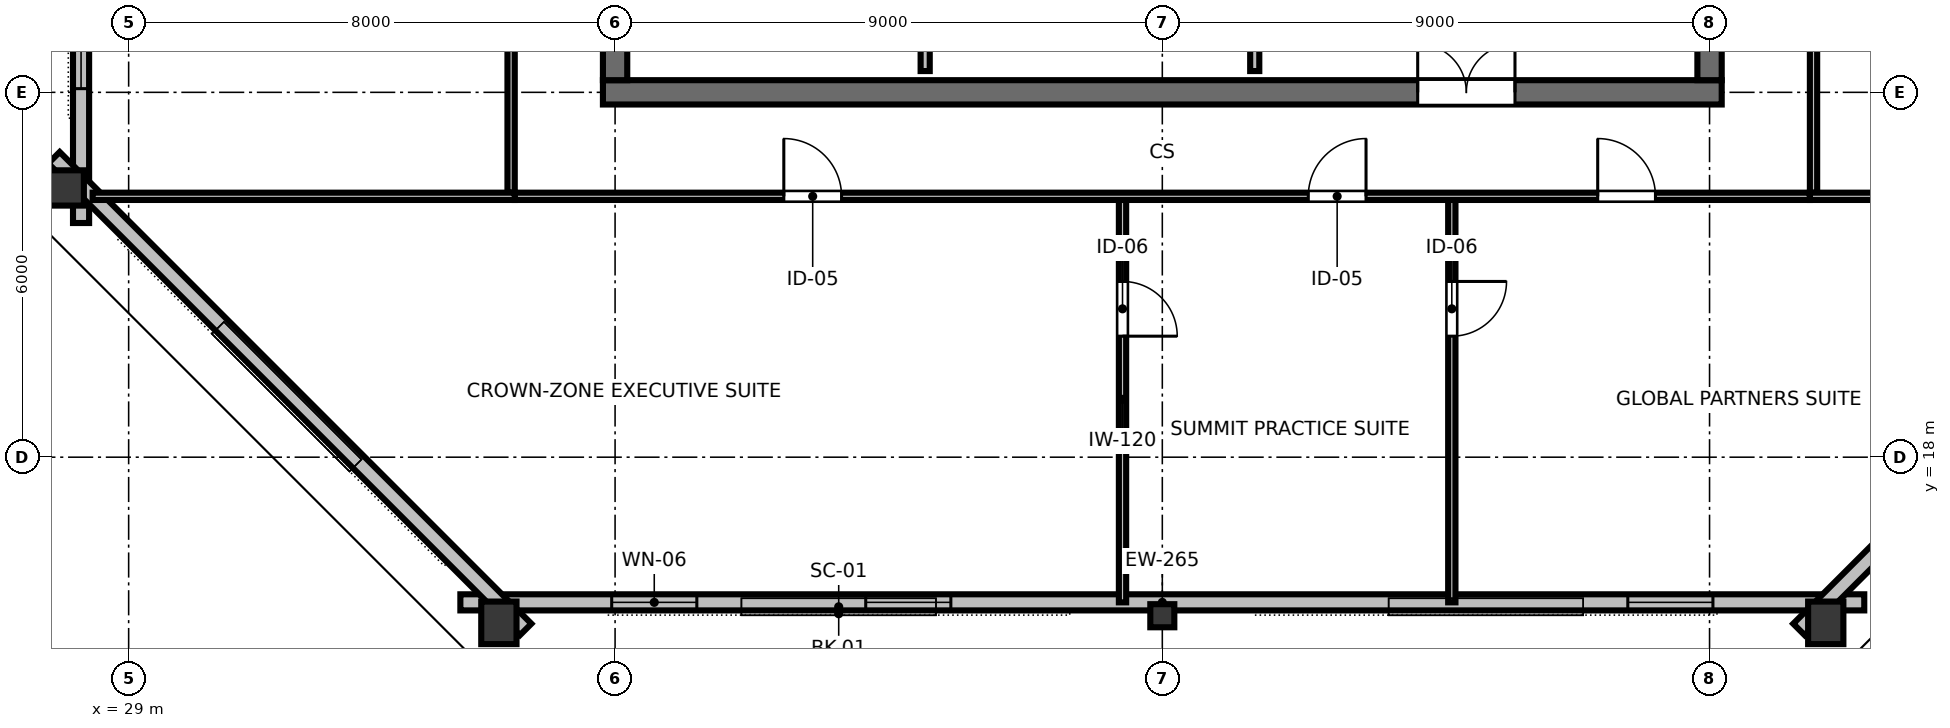
"""IFC4 building model, lengths in metres.
Left out: names, types, materials, properties, quantities, classifications, styles, units other than length and angle.
Written with IfcOpenShell. Run it as: python <this file> out.ifc"""

import sys

from ifc_helpers import new_model, si_unit, direction, frame, frame_2d, origin, origin_2d, place, context, subcontext, project, spatial, rectangle, hollow_rectangle, i_section, extrude, element, fill, save


model = new_model("IFC4")
c1 = context("Model", 3, precision=1e-05, world=origin(), true_north=direction((0.0, 1.0)))
c2 = subcontext(c1, "Body", "Model", "MODEL_VIEW")
j1 = project(units=[si_unit("LENGTHUNIT", "METRE"), si_unit("PLANEANGLEUNIT", "RADIAN")], contexts=[c1])
p1 = place(None, origin())
s1 = spatial("IfcSite", under=j1, at=p1, CompositionType="ELEMENT")
p2 = place(p1, origin())
s2 = spatial("IfcBuilding", under=s1, at=p2, CompositionType="ELEMENT")
p3 = place(p2, frame((0.0, 0.0, 264.6)))
s3 = spatial("IfcBuildingStorey", under=s2, at=p3, CompositionType="ELEMENT", Elevation=264.6)
p4 = place(p3, frame((36.8, 24.0, 0.0), z_axis=(0.0, 0.0, 1.0), x_axis=(1.0, 0.0, 0.0)))
e1 = element("IfcWall", 1, at=p4, inside=s3, PredefinedType="SHEAR", context=c2, shape_type="SweptSolid", body=[
    extrude(rectangle(XDim=18.4, YDim=0.4, at=frame_2d((9.2, 0.0))), origin(), (0.0, 0.0, 1.0), 3.36),
])
p5 = place(p4, frame((13.4, 0.0, 0.0)))
e2 = element("IfcOpeningElement", 2, at=p5, cuts=e1, PredefinedType="OPENING", context=c2, shape_type="SweptSolid", body=[
    extrude(rectangle(XDim=1.6, YDim=2.15, at=frame_2d((0.8, 1.075))), frame((0.0, 0.21, 0.0), z_axis=(0.0, -1.0, 0.0), x_axis=(1.0, 0.0, 0.0)), (0.0, 0.0, 1.0), 0.42),
])
p6 = place(p3, frame((37.0, 24.2, 0.0), z_axis=(0.0, 0.0, 1.0), x_axis=(0.0, 1.0, 0.0)))
e3 = element("IfcWall", 3, at=p6, inside=s3, PredefinedType="SHEAR", context=c2, shape_type="SweptSolid", body=[
    extrude(rectangle(XDim=15.6, YDim=0.4, at=frame_2d((7.8, 0.0))), origin(), (0.0, 0.0, 1.0), 3.36),
])
p7 = place(p6, frame((5.325, 0.0, 0.0)))
e4 = element("IfcOpeningElement", 4, at=p7, cuts=e3, PredefinedType="OPENING", context=c2, shape_type="SweptSolid", body=[
    extrude(rectangle(XDim=1.15, YDim=2.15, at=frame_2d((0.575, 1.075))), frame((0.0, 0.21, 0.0), z_axis=(0.0, -1.0, 0.0), x_axis=(1.0, 0.0, 0.0)), (0.0, 0.0, 1.0), 0.42),
])
p8 = place(p3, frame((55.0, 24.2, 0.0), z_axis=(0.0, 0.0, 1.0), x_axis=(0.0, 1.0, 0.0)))
e5 = element("IfcWall", 5, at=p8, inside=s3, PredefinedType="SHEAR", context=c2, shape_type="SweptSolid", body=[
    extrude(rectangle(XDim=15.6, YDim=0.4, at=frame_2d((7.8, 0.0))), origin(), (0.0, 0.0, 1.0), 3.36),
])
p9 = place(p8, frame((5.325, 0.0, 0.0)))
e6 = element("IfcOpeningElement", 6, at=p9, cuts=e5, PredefinedType="OPENING", context=c2, shape_type="SweptSolid", body=[
    extrude(rectangle(XDim=1.15, YDim=2.15, at=frame_2d((0.575, 1.075))), frame((0.0, 0.21, 0.0), z_axis=(0.0, -1.0, 0.0), x_axis=(1.0, 0.0, 0.0)), (0.0, 0.0, 1.0), 0.42),
])
p10 = place(p3, frame((35.089, 15.276, 0.0), z_axis=(0.0, 0.0, 1.0), x_axis=(1.0, 0.0, 0.0)))
e7 = element("IfcColumn", 7, at=p10, inside=s3, PredefinedType="COLUMN", context=c2, shape_type="SweptSolid", body=[
    extrude(hollow_rectangle(XDim=0.58, YDim=0.7, WallThickness=0.032, at=origin_2d()), origin(), (0.0, 0.0, 1.0), 3.373),
])
p11 = place(p3, frame((46.0, 15.393, 0.0), z_axis=(0.0, 0.0, 1.0), x_axis=(1.0, 0.0, 0.0)))
e8 = element("IfcColumn", 8, at=p11, inside=s3, PredefinedType="COLUMN", context=c2, shape_type="SweptSolid", body=[
    extrude(i_section(OverallWidth=0.395, OverallDepth=0.38, WebThickness=0.019, FlangeThickness=0.03, FilletRadius=0.025, at=origin_2d()), origin(), (0.0, 0.0, 1.0), 3.373),
])
for number, where, z_axis, x_axis in (
    (9, (56.911, 15.276, 0.0), (0.0, 0.0, 1.0), (1.0, 0.0, 0.0)),
    (10, (27.914, 22.428, 0.0), (0.0, 0.0, 1.0), (0.0, 1.0, 0.0)),
):
    element("IfcColumn", number, at=place(p3, frame(where, z_axis=z_axis, x_axis=x_axis)), inside=s3, PredefinedType="COLUMN", context=c2, shape_type="SweptSolid", body=[
        extrude(hollow_rectangle(XDim=0.58, YDim=0.7, WallThickness=0.032, at=origin_2d()), origin(), (0.0, 0.0, 1.0), 3.373),
    ])
p12 = place(p3, frame((34.456, 15.613, 0.0), z_axis=(0.0, 0.0, 1.0), x_axis=(1.0, 0.0, 0.0)))
e11 = element("IfcWall", 11, at=p12, inside=s3, PredefinedType="STANDARD", context=c2, shape_type="SweptSolid", body=[
    extrude(rectangle(XDim=23.089, YDim=0.265, at=frame_2d((11.544, 0.0))), origin(), (0.0, 0.0, 1.0), 2.832),
])
p13 = place(p12, frame((2.489, 0.0, 0.85)))
e12 = element("IfcOpeningElement", 12, at=p13, cuts=e11, PredefinedType="OPENING", context=c2, shape_type="SweptSolid", body=[
    extrude(rectangle(XDim=1.4, YDim=1.2, at=frame_2d((0.7, 0.6))), frame((0.0, 0.142, 0.0), z_axis=(0.0, -1.0, 0.0), x_axis=(1.0, 0.0, 0.0)), (0.0, 0.0, 1.0), 0.285),
])
p14 = place(p12, frame((6.667, 0.0, 0.85)))
e13 = element("IfcOpeningElement", 13, at=p14, cuts=e11, PredefinedType="OPENING", context=c2, shape_type="SweptSolid", body=[
    extrude(rectangle(XDim=1.4, YDim=1.2, at=frame_2d((0.7, 0.6))), frame((0.0, 0.142, 0.0), z_axis=(0.0, -1.0, 0.0), x_axis=(1.0, 0.0, 0.0)), (0.0, 0.0, 1.0), 0.285),
])
p15 = place(p12, frame((19.2, 0.0, 0.85)))
e14 = element("IfcOpeningElement", 14, at=p15, cuts=e11, PredefinedType="OPENING", context=c2, shape_type="SweptSolid", body=[
    extrude(rectangle(XDim=1.4, YDim=1.2, at=frame_2d((0.7, 0.6))), frame((0.0, 0.142, 0.0), z_axis=(0.0, -1.0, 0.0), x_axis=(1.0, 0.0, 0.0)), (0.0, 0.0, 1.0), 0.285),
])
p16 = place(p3, frame((56.47, 15.168, 0.0), z_axis=(0.0, 0.0, 1.0), x_axis=(0.707106781187, 0.707106781187, 0.0)))
e15 = element("IfcWall", 15, at=p16, inside=s3, PredefinedType="STANDARD", context=c2, shape_type="SweptSolid", body=[
    extrude(rectangle(XDim=10.971, YDim=0.265, at=frame_2d((5.485, 0.0))), origin(), (0.0, 0.0, 1.0), 2.832),
])
p17 = place(p3, frame((28.217, 42.149, 0.0), z_axis=(0.0, 0.0, 1.0), x_axis=(0.0, -1.0, 0.0)))
e16 = element("IfcWall", 16, at=p17, inside=s3, PredefinedType="STANDARD", context=c2, shape_type="SweptSolid", body=[
    extrude(rectangle(XDim=20.298, YDim=0.265, at=frame_2d((10.149, 0.0))), origin(), (0.0, 0.0, 1.0), 2.832),
])
p18 = place(p17, frame((2.21, 0.0, 0.85)))
e17 = element("IfcOpeningElement", 17, at=p18, cuts=e16, PredefinedType="OPENING", context=c2, shape_type="SweptSolid", body=[
    extrude(rectangle(XDim=1.4, YDim=1.2, at=frame_2d((0.7, 0.6))), frame((0.0, 0.142, 0.0), z_axis=(0.0, -1.0, 0.0), x_axis=(1.0, 0.0, 0.0)), (0.0, 0.0, 1.0), 0.285),
])
p19 = place(p17, frame((5.83, 0.0, 0.85)))
e18 = element("IfcOpeningElement", 18, at=p19, cuts=e16, PredefinedType="OPENING", context=c2, shape_type="SweptSolid", body=[
    extrude(rectangle(XDim=1.4, YDim=1.2, at=frame_2d((0.7, 0.6))), frame((0.0, 0.142, 0.0), z_axis=(0.0, -1.0, 0.0), x_axis=(1.0, 0.0, 0.0)), (0.0, 0.0, 1.0), 0.285),
])
p20 = place(p17, frame((16.688, 0.0, 0.85)))
e19 = element("IfcOpeningElement", 19, at=p20, cuts=e16, PredefinedType="OPENING", context=c2, shape_type="SweptSolid", body=[
    extrude(rectangle(XDim=1.4, YDim=1.2, at=frame_2d((0.7, 0.6))), frame((0.0, 0.142, 0.0), z_axis=(0.0, -1.0, 0.0), x_axis=(1.0, 0.0, 0.0)), (0.0, 0.0, 1.0), 0.285),
])
p21 = place(p3, frame((27.772, 22.925, 0.0), z_axis=(0.0, 0.0, 1.0), x_axis=(0.707106781187, -0.707106781187, 0.0)))
e20 = element("IfcWall", 20, at=p21, inside=s3, PredefinedType="STANDARD", context=c2, shape_type="SweptSolid", body=[
    extrude(rectangle(XDim=10.971, YDim=0.265, at=frame_2d((5.485, 0.0))), origin(), (0.0, 0.0, 1.0), 2.832),
])
p22 = place(p3, frame((42.1, 24.35, 0.0), z_axis=(0.0, 0.0, 1.0), x_axis=(0.0, 1.0, 0.0)))
e21 = element("IfcWall", 21, at=p22, inside=s3, PredefinedType="PARTITIONING", context=c2, shape_type="SweptSolid", body=[
    extrude(rectangle(XDim=3.9, YDim=0.15, at=frame_2d((1.95, 0.0))), origin(), (0.0, 0.0, 1.0), 3.375),
])
p23 = place(p22, frame((1.5, 0.0, 0.0)))
e22 = element("IfcOpeningElement", 22, at=p23, cuts=e21, PredefinedType="OPENING", context=c2, shape_type="SweptSolid", body=[
    extrude(rectangle(XDim=0.9, YDim=2.15, at=frame_2d((0.45, 1.075))), frame((0.0, 0.085, 0.0), z_axis=(0.0, -1.0, 0.0), x_axis=(1.0, 0.0, 0.0)), (0.0, 0.0, 1.0), 0.17),
])
p24 = place(p3, frame((47.52, 24.35, 0.0), z_axis=(0.0, 0.0, 1.0), x_axis=(0.0, 1.0, 0.0)))
e23 = element("IfcWall", 23, at=p24, inside=s3, PredefinedType="PARTITIONING", context=c2, shape_type="SweptSolid", body=[
    extrude(rectangle(XDim=3.9, YDim=0.15, at=frame_2d((1.95, 0.0))), origin(), (0.0, 0.0, 1.0), 3.375),
])
p25 = place(p24, frame((0.35, 0.0, 0.0)))
e24 = element("IfcOpeningElement", 24, at=p25, cuts=e23, PredefinedType="OPENING", context=c2, shape_type="SweptSolid", body=[
    extrude(rectangle(XDim=0.9, YDim=2.15, at=frame_2d((0.45, 1.075))), frame((0.0, 0.085, 0.0), z_axis=(0.0, -1.0, 0.0), x_axis=(1.0, 0.0, 0.0)), (0.0, 0.0, 1.0), 0.17),
])
p26 = place(p3, frame((45.345, 22.29, 0.0), z_axis=(0.0, 0.0, 1.0), x_axis=(0.0, -1.0, 0.0)))
e25 = element("IfcWall", 25, at=p26, inside=s3, PredefinedType="PARTITIONING", context=c2, shape_type="SweptSolid", body=[
    extrude(rectangle(XDim=6.677, YDim=0.12, at=frame_2d((3.339, 0.0))), origin(), (0.0, 0.0, 1.0), 2.655),
])
p27 = place(p26, frame((1.4, 0.0, 0.0)))
e26 = element("IfcOpeningElement", 26, at=p27, cuts=e25, PredefinedType="OPENING", context=c2, shape_type="SweptSolid", body=[
    extrude(rectangle(XDim=0.9, YDim=2.15, at=frame_2d((0.45, 1.075))), frame((0.0, 0.07, 0.0), z_axis=(0.0, -1.0, 0.0), x_axis=(1.0, 0.0, 0.0)), (0.0, 0.0, 1.0), 0.14),
])
p28 = place(p3, frame((50.761, 22.29, 0.0), z_axis=(0.0, 0.0, 1.0), x_axis=(0.0, -1.0, 0.0)))
e27 = element("IfcWall", 27, at=p28, inside=s3, PredefinedType="PARTITIONING", context=c2, shape_type="SweptSolid", body=[
    extrude(rectangle(XDim=6.677, YDim=0.12, at=frame_2d((3.339, 0.0))), origin(), (0.0, 0.0, 1.0), 2.655),
])
p29 = place(p28, frame((1.4, 0.0, 0.0)))
e28 = element("IfcOpeningElement", 28, at=p29, cuts=e27, PredefinedType="OPENING", context=c2, shape_type="SweptSolid", body=[
    extrude(rectangle(XDim=0.9, YDim=2.15, at=frame_2d((0.45, 1.075))), frame((0.0, 0.07, 0.0), z_axis=(0.0, -1.0, 0.0), x_axis=(1.0, 0.0, 0.0)), (0.0, 0.0, 1.0), 0.14),
])
p30 = place(p3, frame((35.35, 22.29, 0.0), z_axis=(0.0, 0.0, 1.0), x_axis=(1.0, 0.0, 0.0)))
e29 = element("IfcWall", 29, at=p30, inside=s3, PredefinedType="PARTITIONING", context=c2, shape_type="SweptSolid", body=[
    extrude(rectangle(XDim=21.3, YDim=0.12, at=frame_2d((10.65, 0.0))), origin(), (0.0, 0.0, 1.0), 2.655),
])
p31 = place(p30, frame((4.425, 0.0, 0.0)))
e30 = element("IfcOpeningElement", 30, at=p31, cuts=e29, PredefinedType="OPENING", context=c2, shape_type="SweptSolid", body=[
    extrude(rectangle(XDim=0.95, YDim=2.15, at=frame_2d((0.475, 1.075))), frame((0.0, 0.07, 0.0), z_axis=(0.0, -1.0, 0.0), x_axis=(1.0, 0.0, 0.0)), (0.0, 0.0, 1.0), 0.14),
])
p32 = place(p30, frame((13.051, 0.0, 0.0)))
e31 = element("IfcOpeningElement", 31, at=p32, cuts=e29, PredefinedType="OPENING", context=c2, shape_type="SweptSolid", body=[
    extrude(rectangle(XDim=0.95, YDim=2.15, at=frame_2d((0.475, 1.075))), frame((0.0, 0.07, 0.0), z_axis=(0.0, -1.0, 0.0), x_axis=(1.0, 0.0, 0.0)), (0.0, 0.0, 1.0), 0.14),
])
p33 = place(p30, frame((17.811, 0.0, 0.0)))
e32 = element("IfcOpeningElement", 32, at=p33, cuts=e29, PredefinedType="OPENING", context=c2, shape_type="SweptSolid", body=[
    extrude(rectangle(XDim=0.95, YDim=2.15, at=frame_2d((0.475, 1.075))), frame((0.0, 0.07, 0.0), z_axis=(0.0, -1.0, 0.0), x_axis=(1.0, 0.0, 0.0)), (0.0, 0.0, 1.0), 0.14),
])
p34 = place(p3, frame((35.29, 22.35, 0.0), z_axis=(0.0, 0.0, 1.0), x_axis=(0.0, 1.0, 0.0)))
e33 = element("IfcWall", 33, at=p34, inside=s3, PredefinedType="PARTITIONING", context=c2, shape_type="SweptSolid", body=[
    extrude(rectangle(XDim=19.3, YDim=0.12, at=frame_2d((9.65, 0.0))), origin(), (0.0, 0.0, 1.0), 2.655),
])
p35 = place(p34, frame((2.847, 0.0, 0.0)))
e34 = element("IfcOpeningElement", 34, at=p35, cuts=e33, PredefinedType="OPENING", context=c2, shape_type="SweptSolid", body=[
    extrude(rectangle(XDim=0.95, YDim=2.15, at=frame_2d((0.475, 1.075))), frame((0.0, 0.07, 0.0), z_axis=(0.0, -1.0, 0.0), x_axis=(1.0, 0.0, 0.0)), (0.0, 0.0, 1.0), 0.14),
])
p36 = place(p34, frame((8.606, 0.0, 0.0)))
e35 = element("IfcOpeningElement", 35, at=p36, cuts=e33, PredefinedType="OPENING", context=c2, shape_type="SweptSolid", body=[
    extrude(rectangle(XDim=0.95, YDim=2.15, at=frame_2d((0.475, 1.075))), frame((0.0, 0.07, 0.0), z_axis=(0.0, -1.0, 0.0), x_axis=(1.0, 0.0, 0.0)), (0.0, 0.0, 1.0), 0.14),
])
p37 = place(p34, frame((14.935, 0.0, 0.0)))
e36 = element("IfcOpeningElement", 36, at=p37, cuts=e33, PredefinedType="OPENING", context=c2, shape_type="SweptSolid", body=[
    extrude(rectangle(XDim=0.95, YDim=2.15, at=frame_2d((0.475, 1.075))), frame((0.0, 0.07, 0.0), z_axis=(0.0, -1.0, 0.0), x_axis=(1.0, 0.0, 0.0)), (0.0, 0.0, 1.0), 0.14),
])
p38 = place(p3, frame((56.71, 22.35, 0.0), z_axis=(0.0, 0.0, 1.0), x_axis=(0.0, 1.0, 0.0)))
e37 = element("IfcWall", 37, at=p38, inside=s3, PredefinedType="PARTITIONING", context=c2, shape_type="SweptSolid", body=[
    extrude(rectangle(XDim=19.3, YDim=0.12, at=frame_2d((9.65, 0.0))), origin(), (0.0, 0.0, 1.0), 2.655),
])
p39 = place(p38, frame((3.646, 0.0, 0.0)))
e38 = element("IfcOpeningElement", 38, at=p39, cuts=e37, PredefinedType="OPENING", context=c2, shape_type="SweptSolid", body=[
    extrude(rectangle(XDim=0.95, YDim=2.15, at=frame_2d((0.475, 1.075))), frame((0.0, 0.07, 0.0), z_axis=(0.0, -1.0, 0.0), x_axis=(1.0, 0.0, 0.0)), (0.0, 0.0, 1.0), 0.14),
])
p40 = place(p38, frame((13.096, 0.0, 0.0)))
e39 = element("IfcOpeningElement", 39, at=p40, cuts=e37, PredefinedType="OPENING", context=c2, shape_type="SweptSolid", body=[
    extrude(rectangle(XDim=0.95, YDim=2.15, at=frame_2d((0.475, 1.075))), frame((0.0, 0.07, 0.0), z_axis=(0.0, -1.0, 0.0), x_axis=(1.0, 0.0, 0.0)), (0.0, 0.0, 1.0), 0.14),
])
for number, where, z_axis, x_axis in (
    (40, (35.35, 22.29, 0.0), (0.0, 0.0, 1.0), (-1.0, 0.0, 0.0)),
    (41, (56.65, 22.29, 0.0), (0.0, 0.0, 1.0), (1.0, 0.0, 0.0)),
):
    element("IfcWall", number, at=place(p3, frame(where, z_axis=z_axis, x_axis=x_axis)), inside=s3, PredefinedType="PARTITIONING", context=c2, shape_type="SweptSolid", body=[
        extrude(rectangle(XDim=6.942, YDim=0.12, at=frame_2d((3.471, 0.0))), origin(), (0.0, 0.0, 1.0), 2.655),
    ])
p41 = place(p13, origin())
e42 = element("IfcWindow", 42, at=p41, inside=s3, PartitioningType="SINGLE_PANEL", PredefinedType="WINDOW", context=c2, shape_type="SweptSolid", body=[
    extrude(rectangle(XDim=1.4, YDim=1.2, at=frame_2d((0.7, 0.6))), frame((0.0, 0.03, 0.0), z_axis=(0.0, -1.0, 0.0), x_axis=(1.0, 0.0, 0.0)), (0.0, 0.0, 1.0), 0.06),
])
fill(e12, e42)
p42 = place(p14, origin())
e43 = element("IfcWindow", 43, at=p42, inside=s3, PartitioningType="SINGLE_PANEL", PredefinedType="WINDOW", context=c2, shape_type="SweptSolid", body=[
    extrude(rectangle(XDim=1.4, YDim=1.2, at=frame_2d((0.7, 0.6))), frame((0.0, 0.03, 0.0), z_axis=(0.0, -1.0, 0.0), x_axis=(1.0, 0.0, 0.0)), (0.0, 0.0, 1.0), 0.06),
])
fill(e13, e43)
p43 = place(p15, origin())
e44 = element("IfcWindow", 44, at=p43, inside=s3, PartitioningType="SINGLE_PANEL", PredefinedType="WINDOW", context=c2, shape_type="SweptSolid", body=[
    extrude(rectangle(XDim=1.4, YDim=1.2, at=frame_2d((0.7, 0.6))), frame((0.0, 0.03, 0.0), z_axis=(0.0, -1.0, 0.0), x_axis=(1.0, 0.0, 0.0)), (0.0, 0.0, 1.0), 0.06),
])
fill(e14, e44)
p44 = place(p20, origin())
e45 = element("IfcWindow", 45, at=p44, inside=s3, PartitioningType="SINGLE_PANEL", PredefinedType="WINDOW", context=c2, shape_type="SweptSolid", body=[
    extrude(rectangle(XDim=1.4, YDim=1.2, at=frame_2d((0.7, 0.6))), frame((0.0, 0.03, 0.0), z_axis=(0.0, -1.0, 0.0), x_axis=(1.0, 0.0, 0.0)), (0.0, 0.0, 1.0), 0.06),
])
fill(e19, e45)
p45 = place(p5, origin())
e46 = element("IfcDoor", 46, at=p45, inside=s3, OperationType="DOUBLE_DOOR_SINGLE_SWING", PredefinedType="DOOR", context=c2, shape_type="SweptSolid", body=[
    extrude(rectangle(XDim=1.6, YDim=2.15, at=frame_2d((0.8, 1.075))), frame((0.0, 0.025, 0.0), z_axis=(0.0, -1.0, 0.0), x_axis=(1.0, 0.0, 0.0)), (0.0, 0.0, 1.0), 0.05),
])
fill(e2, e46)
p46 = place(p27, origin())
e47 = element("IfcDoor", 47, at=p46, inside=s3, OperationType="SINGLE_SWING_RIGHT", PredefinedType="DOOR", context=c2, shape_type="SweptSolid", body=[
    extrude(rectangle(XDim=0.9, YDim=2.15, at=frame_2d((0.45, 1.075))), frame((0.0, 0.025, 0.0), z_axis=(0.0, -1.0, 0.0), x_axis=(1.0, 0.0, 0.0)), (0.0, 0.0, 1.0), 0.05),
])
fill(e26, e47)
p47 = place(p29, origin())
e48 = element("IfcDoor", 48, at=p47, inside=s3, OperationType="SINGLE_SWING_LEFT", PredefinedType="DOOR", context=c2, shape_type="SweptSolid", body=[
    extrude(rectangle(XDim=0.9, YDim=2.15, at=frame_2d((0.45, 1.075))), frame((0.0, 0.025, 0.0), z_axis=(0.0, -1.0, 0.0), x_axis=(1.0, 0.0, 0.0)), (0.0, 0.0, 1.0), 0.05),
])
fill(e28, e48)
p48 = place(p31, origin())
e49 = element("IfcDoor", 49, at=p48, inside=s3, OperationType="SINGLE_SWING_LEFT", PredefinedType="DOOR", context=c2, shape_type="SweptSolid", body=[
    extrude(rectangle(XDim=0.95, YDim=2.15, at=frame_2d((0.475, 1.075))), frame((0.0, 0.025, 0.0), z_axis=(0.0, -1.0, 0.0), x_axis=(1.0, 0.0, 0.0)), (0.0, 0.0, 1.0), 0.05),
])
fill(e30, e49)
p49 = place(p32, origin())
e50 = element("IfcDoor", 50, at=p49, inside=s3, OperationType="SINGLE_SWING_RIGHT", PredefinedType="DOOR", context=c2, shape_type="SweptSolid", body=[
    extrude(rectangle(XDim=0.95, YDim=2.15, at=frame_2d((0.475, 1.075))), frame((0.0, 0.025, 0.0), z_axis=(0.0, -1.0, 0.0), x_axis=(1.0, 0.0, 0.0)), (0.0, 0.0, 1.0), 0.05),
])
fill(e31, e50)
p50 = place(p33, origin())
e51 = element("IfcDoor", 51, at=p50, inside=s3, OperationType="SINGLE_SWING_LEFT", PredefinedType="DOOR", context=c2, shape_type="SweptSolid", body=[
    extrude(rectangle(XDim=0.95, YDim=2.15, at=frame_2d((0.475, 1.075))), frame((0.0, 0.025, 0.0), z_axis=(0.0, -1.0, 0.0), x_axis=(1.0, 0.0, 0.0)), (0.0, 0.0, 1.0), 0.05),
])
fill(e32, e51)
save(model, sys.argv[1])
